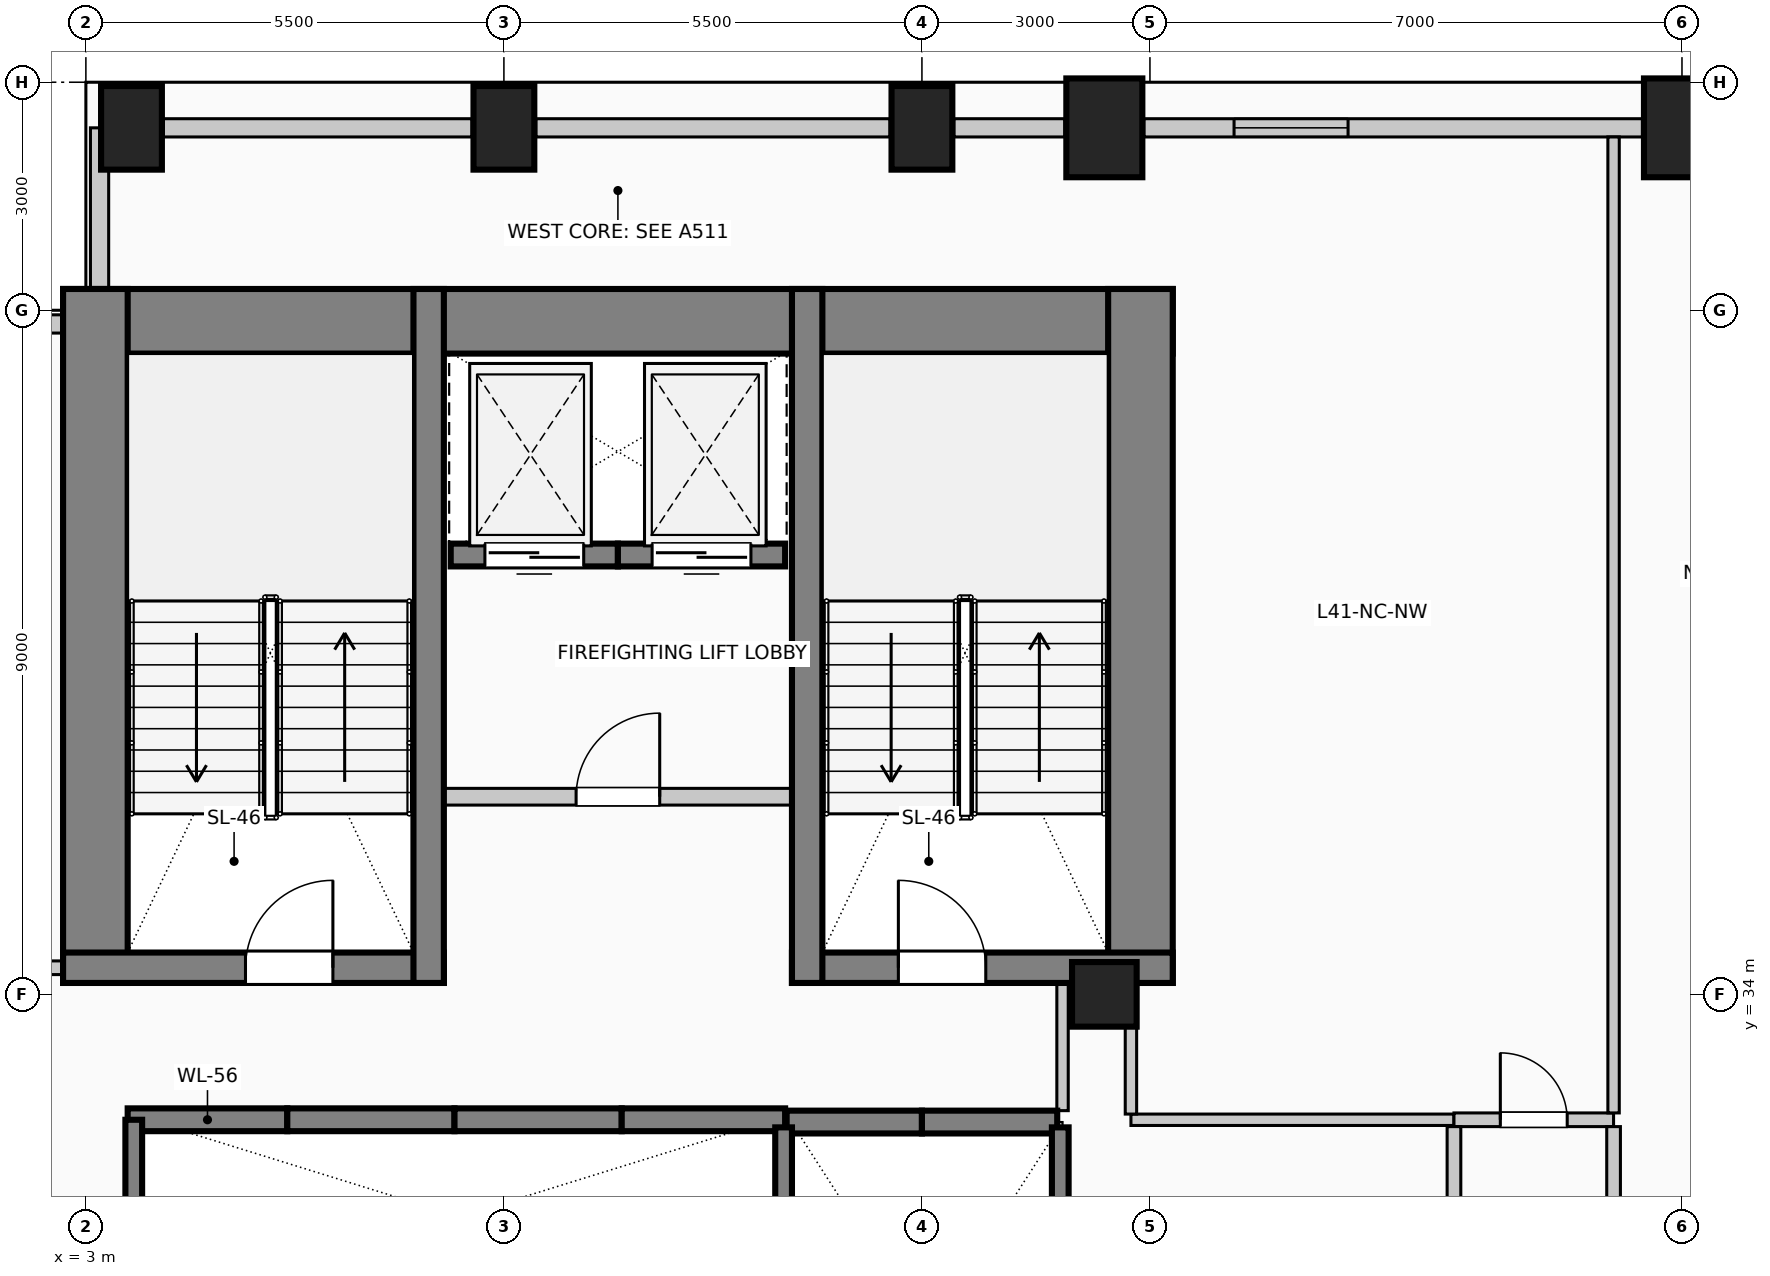
"""IFC4 building model, lengths in metres.
Left out: names, types, materials, properties, quantities, classifications, styles, units other than length and angle.
Written with IfcOpenShell. Run it as: python <this file> out.ifc"""

import sys

from ifc_helpers import new_model, si_unit, direction, frame, frame_2d, origin, origin_2d, place, context, subcontext, project, spatial, rectangle, circle, extrude, element, fill, save


model = new_model("IFC4")
c1 = context("Model", 3, precision=1e-05, world=origin(), true_north=direction((0.0, 1.0)))
c2 = subcontext(c1, "Body", "Model", "MODEL_VIEW")
j1 = project(units=[si_unit("LENGTHUNIT", "METRE"), si_unit("PLANEANGLEUNIT", "RADIAN")], contexts=[c1])
p1 = place(None, origin())
s1 = spatial("IfcSite", under=j1, at=p1, CompositionType="ELEMENT")
p2 = place(p1, origin())
s2 = spatial("IfcBuilding", under=s1, at=p2, CompositionType="ELEMENT")
p3 = place(p2, frame((0.0, 0.0, 170.6)))
s3 = spatial("IfcBuildingStorey", under=s2, at=p3, CompositionType="ELEMENT", Elevation=170.6)
p4 = place(p3, frame((2.7, 42.855, 0.0), z_axis=(0.0, 0.0, 1.0), x_axis=(1.0, 0.0, 0.0)))
e1 = element("IfcWall", 1, at=p4, inside=s3, PredefinedType="SHEAR", context=c2, shape_type="SweptSolid", body=[
    extrude(rectangle(XDim=14.6, YDim=0.85, at=frame_2d((7.3, 0.0))), origin(), (0.0, 0.0, 1.0), 4.0),
])
for number, where, z_axis, x_axis in (
    (2, (3.125, 34.15, 0.0), (0.0, 0.0, 1.0), (0.0, 1.0, 0.0)),
    (3, (16.875, 34.15, 0.0), (0.0, 0.0, 1.0), (0.0, 1.0, 0.0)),
):
    element("IfcWall", number, at=place(p3, frame(where, z_axis=z_axis, x_axis=x_axis)), inside=s3, PredefinedType="SHEAR", context=c2, shape_type="SweptSolid", body=[
        extrude(rectangle(XDim=9.13, YDim=0.85, at=frame_2d((4.565, 0.0))), origin(), (0.0, 0.0, 1.0), 4.0),
    ])
p5 = place(p3, frame((2.7, 34.35, 0.0), z_axis=(0.0, 0.0, 1.0), x_axis=(1.0, 0.0, 0.0)))
e4 = element("IfcWall", 4, at=p5, inside=s3, PredefinedType="SHEAR", context=c2, shape_type="SweptSolid", body=[
    extrude(rectangle(XDim=5.01, YDim=0.4, at=frame_2d((2.505, 0.0))), origin(), (0.0, 0.0, 1.0), 4.0),
])
p6 = place(p5, frame((2.4, 0.0, 0.0)))
e5 = element("IfcOpeningElement", 5, at=p6, cuts=e4, PredefinedType="OPENING", context=c2, shape_type="SweptSolid", body=[
    extrude(rectangle(XDim=1.15, YDim=2.2, at=frame_2d((0.575, 1.1))), frame((0.0, 0.21, 0.0), z_axis=(0.0, -1.0, 0.0), x_axis=(1.0, 0.0, 0.0)), (0.0, 0.0, 1.0), 0.42),
])
p7 = place(p3, frame((12.29, 34.35, 0.0), z_axis=(0.0, 0.0, 1.0), x_axis=(1.0, 0.0, 0.0)))
e6 = element("IfcWall", 6, at=p7, inside=s3, PredefinedType="SHEAR", context=c2, shape_type="SweptSolid", body=[
    extrude(rectangle(XDim=5.01, YDim=0.4, at=frame_2d((2.505, 0.0))), origin(), (0.0, 0.0, 1.0), 4.0),
])
p8 = place(p7, frame((1.4, 0.0, 0.0)))
e7 = element("IfcOpeningElement", 7, at=p8, cuts=e6, PredefinedType="OPENING", context=c2, shape_type="SweptSolid", body=[
    extrude(rectangle(XDim=1.15, YDim=2.2, at=frame_2d((0.575, 1.1))), frame((0.0, 0.21, 0.0), z_axis=(0.0, -1.0, 0.0), x_axis=(1.0, 0.0, 0.0)), (0.0, 0.0, 1.0), 0.42),
])
for number, where, z_axis, x_axis in (
    (8, (7.51, 34.15, 0.0), (0.0, 0.0, 1.0), (0.0, 1.0, 0.0)),
    (9, (12.49, 34.15, 0.0), (0.0, 0.0, 1.0), (0.0, 1.0, 0.0)),
):
    element("IfcWall", number, at=place(p3, frame(where, z_axis=z_axis, x_axis=x_axis)), inside=s3, PredefinedType="SHEAR", context=c2, shape_type="SweptSolid", body=[
        extrude(rectangle(XDim=9.13, YDim=0.4, at=frame_2d((4.565, 0.0))), origin(), (0.0, 0.0, 1.0), 4.0),
    ])
for number, where, z_axis, x_axis in (
    (10, (3.6, 45.4, 0.0), (0.0, 0.0, 1.0), (1.0, 0.0, 0.0)),
    (11, (8.5, 45.4, 0.0), (0.0, 0.0, 1.0), (1.0, 0.0, 0.0)),
    (12, (14.0, 45.4, 0.0), (0.0, 0.0, 1.0), (1.0, 0.0, 0.0)),
):
    element("IfcColumn", number, at=place(p3, frame(where, z_axis=z_axis, x_axis=x_axis)), inside=s3, PredefinedType="COLUMN", context=c2, shape_type="SweptSolid", body=[
        extrude(rectangle(XDim=0.8, YDim=1.1, at=origin_2d()), origin(), (0.0, 0.0, 1.0), 4.0),
    ])
for number, where, z_axis, x_axis in (
    (13, (16.4, 45.4, 0.0), (0.0, 0.0, 1.0), (1.0, 0.0, 0.0)),
    (14, (24.0, 45.4, 0.0), (0.0, 0.0, 1.0), (1.0, 0.0, 0.0)),
):
    element("IfcColumn", number, at=place(p3, frame(where, z_axis=z_axis, x_axis=x_axis)), inside=s3, PredefinedType="COLUMN", context=c2, shape_type="SweptSolid", body=[
        extrude(rectangle(XDim=1.0, YDim=1.3, at=origin_2d()), origin(), (0.0, 0.0, 1.0), 4.0),
    ])
p9 = place(p3, frame((16.4, 34.0, 0.0), z_axis=(0.0, 0.0, 1.0), x_axis=(1.0, 0.0, 0.0)))
e15 = element("IfcColumn", 15, at=p9, inside=s3, PredefinedType="COLUMN", context=c2, shape_type="SweptSolid", body=[
    extrude(circle(Radius=0.425, at=origin_2d()), origin(), (0.0, 0.0, 1.0), 4.0),
])
p10 = place(p3, frame((4.02, 45.4, 0.0), z_axis=(0.0, 0.0, 1.0), x_axis=(1.0, 0.0, 0.0)))
e16 = element("IfcWall", 16, at=p10, inside=s3, PredefinedType="SOLIDWALL", context=c2, shape_type="SweptSolid", body=[
    extrude(rectangle(XDim=4.06, YDim=0.24, at=frame_2d((2.03, 0.0))), origin(), (0.0, 0.0, 1.0), 2.975),
])
p11 = place(p3, frame((8.92, 45.4, 0.0), z_axis=(0.0, 0.0, 1.0), x_axis=(1.0, 0.0, 0.0)))
e17 = element("IfcWall", 17, at=p11, inside=s3, PredefinedType="SOLIDWALL", context=c2, shape_type="SweptSolid", body=[
    extrude(rectangle(XDim=4.66, YDim=0.24, at=frame_2d((2.33, 0.0))), origin(), (0.0, 0.0, 1.0), 2.975),
])
p12 = place(p3, frame((14.42, 45.4, 0.0), z_axis=(0.0, 0.0, 1.0), x_axis=(1.0, 0.0, 0.0)))
e18 = element("IfcWall", 18, at=p12, inside=s3, PredefinedType="SOLIDWALL", context=c2, shape_type="SweptSolid", body=[
    extrude(rectangle(XDim=1.46, YDim=0.24, at=frame_2d((0.73, 0.0))), origin(), (0.0, 0.0, 1.0), 2.975),
])
p13 = place(p3, frame((16.92, 45.4, 0.0), z_axis=(0.0, 0.0, 1.0), x_axis=(1.0, 0.0, 0.0)))
e19 = element("IfcWall", 19, at=p13, inside=s3, PredefinedType="SOLIDWALL", context=c2, shape_type="SweptSolid", body=[
    extrude(rectangle(XDim=6.56, YDim=0.24, at=frame_2d((3.28, 0.0))), origin(), (0.0, 0.0, 1.0), 2.975),
])
p14 = place(p13, frame((1.187, 0.0, 0.42)))
e20 = element("IfcOpeningElement", 20, at=p14, cuts=e19, PredefinedType="OPENING", context=c2, shape_type="SweptSolid", body=[
    extrude(rectangle(XDim=1.5, YDim=2.2, at=frame_2d((0.75, 1.1))), frame((0.0, 0.13, 0.0), z_axis=(0.0, -1.0, 0.0), x_axis=(1.0, 0.0, 0.0)), (0.0, 0.0, 1.0), 0.26),
])
p15 = place(p3, frame((0.6, 42.82, 0.0), z_axis=(0.0, 0.0, 1.0), x_axis=(1.0, 0.0, 0.0)))
e21 = element("IfcWall", 21, at=p15, inside=s3, PredefinedType="SOLIDWALL", context=c2, shape_type="SweptSolid", body=[
    extrude(rectangle(XDim=2.095, YDim=0.24, at=frame_2d((1.047, 0.0))), origin(), (0.0, 0.0, 1.0), 3.725),
])
p16 = place(p3, frame((3.18, 43.285, 0.0), z_axis=(0.0, 0.0, 1.0), x_axis=(0.0, 1.0, 0.0)))
e22 = element("IfcWall", 22, at=p16, inside=s3, PredefinedType="SOLIDWALL", context=c2, shape_type="SweptSolid", body=[
    extrude(rectangle(XDim=2.115, YDim=0.24, at=frame_2d((1.058, 0.0))), origin(), (0.0, 0.0, 1.0), 3.725),
])
for number, where, z_axis, x_axis in (
    (23, (12.22, 32.32, 0.0), (0.0, 0.0, 1.0), (1.0, 0.0, 0.0)),
    (24, (14.0, 32.32, 0.0), (0.0, 0.0, 1.0), (1.0, 0.0, 0.0)),
):
    element("IfcWall", number, at=place(p3, frame(where, z_axis=z_axis, x_axis=x_axis)), inside=s3, PredefinedType="SOLIDWALL", context=c2, shape_type="SweptSolid", body=[
        extrude(rectangle(XDim=1.78, YDim=0.3, at=frame_2d((0.89, 0.0))), origin(), (0.0, 0.0, 1.0), 4.0),
    ])
p17 = place(p3, frame((3.55, 32.35, 0.0), z_axis=(0.0, 0.0, 1.0), x_axis=(1.0, 0.0, 0.0)))
e25 = element("IfcWall", 25, at=p17, inside=s3, PredefinedType="SOLIDWALL", context=c2, shape_type="SweptSolid", body=[
    extrude(rectangle(XDim=2.1, YDim=0.3, at=frame_2d((1.05, 0.0))), origin(), (0.0, 0.0, 1.0), 4.0),
])
p18 = place(p3, frame((5.65, 32.35, 0.0), z_axis=(0.0, 0.0, 1.0), x_axis=(1.0, 0.0, 0.0)))
e26 = element("IfcWall", 26, at=p18, inside=s3, PredefinedType="SOLIDWALL", context=c2, shape_type="SweptSolid", body=[
    extrude(rectangle(XDim=2.2, YDim=0.3, at=frame_2d((1.1, 0.0))), origin(), (0.0, 0.0, 1.0), 4.0),
])
p19 = place(p3, frame((7.85, 32.35, 0.0), z_axis=(0.0, 0.0, 1.0), x_axis=(1.0, 0.0, 0.0)))
e27 = element("IfcWall", 27, at=p19, inside=s3, PredefinedType="SOLIDWALL", context=c2, shape_type="SweptSolid", body=[
    extrude(rectangle(XDim=2.2, YDim=0.3, at=frame_2d((1.1, 0.0))), origin(), (0.0, 0.0, 1.0), 4.0),
])
p20 = place(p3, frame((10.05, 32.35, 0.0), z_axis=(0.0, 0.0, 1.0), x_axis=(1.0, 0.0, 0.0)))
e28 = element("IfcWall", 28, at=p20, inside=s3, PredefinedType="SOLIDWALL", context=c2, shape_type="SweptSolid", body=[
    extrude(rectangle(XDim=2.15, YDim=0.3, at=frame_2d((1.075, 0.0))), origin(), (0.0, 0.0, 1.0), 4.0),
])
p21 = place(p3, frame((10.0, 39.78, 0.0), z_axis=(0.0, 0.0, 1.0), x_axis=(-1.0, 0.0, 0.0)))
e29 = element("IfcWall", 29, at=p21, inside=s3, PredefinedType="SOLIDWALL", context=c2, shape_type="SweptSolid", body=[
    extrude(rectangle(XDim=2.2, YDim=0.3, at=frame_2d((1.1, 0.0))), origin(), (0.0, 0.0, 1.0), 4.0),
])
p22 = place(p21, frame((0.45, 0.0, 0.0)))
e30 = element("IfcOpeningElement", 30, at=p22, cuts=e29, PredefinedType="OPENING", context=c2, shape_type="SweptSolid", body=[
    extrude(rectangle(XDim=1.3, YDim=2.25, at=frame_2d((0.65, 1.125))), frame((0.0, 0.16, 0.0), z_axis=(0.0, -1.0, 0.0), x_axis=(1.0, 0.0, 0.0)), (0.0, 0.0, 1.0), 0.32),
])
p23 = place(p3, frame((12.2, 39.78, 0.0), z_axis=(0.0, 0.0, 1.0), x_axis=(-1.0, 0.0, 0.0)))
e31 = element("IfcWall", 31, at=p23, inside=s3, PredefinedType="SOLIDWALL", context=c2, shape_type="SweptSolid", body=[
    extrude(rectangle(XDim=2.2, YDim=0.3, at=frame_2d((1.1, 0.0))), origin(), (0.0, 0.0, 1.0), 4.0),
])
p24 = place(p23, frame((0.45, 0.0, 0.0)))
e32 = element("IfcOpeningElement", 32, at=p24, cuts=e31, PredefinedType="OPENING", context=c2, shape_type="SweptSolid", body=[
    extrude(rectangle(XDim=1.3, YDim=2.25, at=frame_2d((0.65, 1.125))), frame((0.0, 0.16, 0.0), z_axis=(0.0, -1.0, 0.0), x_axis=(1.0, 0.0, 0.0)), (0.0, 0.0, 1.0), 0.32),
])
p25 = place(p3, frame((3.63, 26.8, 0.0), z_axis=(0.0, 0.0, 1.0), x_axis=(0.0, 1.0, 0.0)))
e33 = element("IfcWall", 33, at=p25, inside=s3, PredefinedType="SOLIDWALL", context=c2, shape_type="SweptSolid", body=[
    extrude(rectangle(XDim=5.55, YDim=0.22, at=frame_2d((2.775, 0.0))), origin(), (0.0, 0.0, 1.0), 4.0),
])
for number, where, z_axis, x_axis in (
    (34, (12.18, 26.8, 0.0), (0.0, 0.0, 1.0), (0.0, 1.0, 0.0)),
    (35, (15.82, 26.8, 0.0), (0.0, 0.0, 1.0), (0.0, 1.0, 0.0)),
):
    element("IfcWall", number, at=place(p3, frame(where, z_axis=z_axis, x_axis=x_axis)), inside=s3, PredefinedType="SOLIDWALL", context=c2, shape_type="SweptSolid", body=[
        extrude(rectangle(XDim=5.45, YDim=0.22, at=frame_2d((2.725, 0.0))), origin(), (0.0, 0.0, 1.0), 4.0),
    ])
p26 = place(p3, frame((7.51, 36.6, 0.0), z_axis=(0.0, 0.0, 1.0), x_axis=(1.0, 0.0, 0.0)))
e36 = element("IfcWall", 36, at=p26, inside=s3, PredefinedType="PARTITIONING", context=c2, shape_type="SweptSolid", body=[
    extrude(rectangle(XDim=4.98, YDim=0.22, at=frame_2d((2.49, 0.0))), origin(), (0.0, 0.0, 1.0), 3.725),
])
p27 = place(p26, frame((1.94, 0.0, 0.0)))
e37 = element("IfcOpeningElement", 37, at=p27, cuts=e36, PredefinedType="OPENING", context=c2, shape_type="SweptSolid", body=[
    extrude(rectangle(XDim=1.1, YDim=2.2, at=frame_2d((0.55, 1.1))), frame((0.0, 0.12, 0.0), z_axis=(0.0, -1.0, 0.0), x_axis=(1.0, 0.0, 0.0)), (0.0, 0.0, 1.0), 0.24),
])
p28 = place(p3, frame((16.75, 32.35, 0.0), z_axis=(0.0, 0.0, 1.0), x_axis=(1.0, 0.0, 0.0)))
e38 = element("IfcWall", 38, at=p28, inside=s3, PredefinedType="PARTITIONING", context=c2, shape_type="SweptSolid", body=[
    extrude(rectangle(XDim=4.25, YDim=0.15, at=frame_2d((2.125, 0.0))), origin(), (0.0, 0.0, 1.0), 3.725),
])
p29 = place(p3, frame((21.0, 32.35, 0.0), z_axis=(0.0, 0.0, 1.0), x_axis=(1.0, 0.0, 0.0)))
e39 = element("IfcWall", 39, at=p29, inside=s3, PredefinedType="PARTITIONING", context=c2, shape_type="SweptSolid", body=[
    extrude(rectangle(XDim=2.1, YDim=0.18, at=frame_2d((1.05, 0.0))), origin(), (0.0, 0.0, 1.0), 3.725),
])
p30 = place(p29, frame((0.61, 0.0, 0.0)))
e40 = element("IfcOpeningElement", 40, at=p30, cuts=e39, PredefinedType="OPENING", context=c2, shape_type="SweptSolid", body=[
    extrude(rectangle(XDim=0.88, YDim=2.1, at=frame_2d((0.44, 1.05))), frame((0.0, 0.1, 0.0), z_axis=(0.0, -1.0, 0.0), x_axis=(1.0, 0.0, 0.0)), (0.0, 0.0, 1.0), 0.2),
])
p31 = place(p3, frame((1.15, 34.35, 0.0), z_axis=(0.0, 0.0, 1.0), x_axis=(1.0, 0.0, 0.0)))
e41 = element("IfcWall", 41, at=p31, inside=s3, PredefinedType="PARTITIONING", context=c2, shape_type="SweptSolid", body=[
    extrude(rectangle(XDim=1.55, YDim=0.18, at=frame_2d((0.775, 0.0))), origin(), (0.0, 0.0, 1.0), 3.725),
])
p32 = place(p3, frame((15.85, 32.47, 0.0), z_axis=(0.0, 0.0, 1.0), x_axis=(0.0, 1.0, 0.0)))
e42 = element("IfcWall", 42, at=p32, inside=s3, PredefinedType="PARTITIONING", context=c2, shape_type="SweptSolid", body=[
    extrude(rectangle(XDim=1.68, YDim=0.15, at=frame_2d((0.84, 0.0))), origin(), (0.0, 0.0, 1.0), 3.725),
])
p33 = place(p3, frame((16.75, 32.425, 0.0), z_axis=(0.0, 0.0, 1.0), x_axis=(0.0, 1.0, 0.0)))
e43 = element("IfcWall", 43, at=p33, inside=s3, PredefinedType="PARTITIONING", context=c2, shape_type="SweptSolid", body=[
    extrude(rectangle(XDim=1.15, YDim=0.15, at=frame_2d((0.575, 0.0))), origin(), (0.0, 0.0, 1.0), 3.725),
])
p34 = place(p3, frame((21.0, 24.875, 0.0), z_axis=(0.0, 0.0, 1.0), x_axis=(0.0, 1.0, 0.0)))
e44 = element("IfcWall", 44, at=p34, inside=s3, PredefinedType="PARTITIONING", context=c2, shape_type="SweptSolid", body=[
    extrude(rectangle(XDim=7.385, YDim=0.18, at=frame_2d((3.692, 0.0))), origin(), (0.0, 0.0, 1.0), 3.725),
])
p35 = place(p3, frame((23.1, 29.14, 0.0), z_axis=(0.0, 0.0, 1.0), x_axis=(0.0, 1.0, 0.0)))
e45 = element("IfcWall", 45, at=p35, inside=s3, PredefinedType="PARTITIONING", context=c2, shape_type="SweptSolid", body=[
    extrude(rectangle(XDim=3.12, YDim=0.18, at=frame_2d((1.56, 0.0))), origin(), (0.0, 0.0, 1.0), 3.725),
])
p36 = place(p3, frame((23.1, 32.44, 0.0), z_axis=(0.0, 0.0, 1.0), x_axis=(0.0, 1.0, 0.0)))
e46 = element("IfcWall", 46, at=p36, inside=s3, PredefinedType="PARTITIONING", context=c2, shape_type="SweptSolid", body=[
    extrude(rectangle(XDim=12.84, YDim=0.15, at=frame_2d((6.42, 0.0))), origin(), (0.0, 0.0, 1.0), 3.725),
])
p37 = place(p14, origin())
e47 = element("IfcWindow", 47, at=p37, inside=s3, PartitioningType="SINGLE_PANEL", PredefinedType="WINDOW", context=c2, shape_type="SweptSolid", body=[
    extrude(rectangle(XDim=1.5, YDim=2.2, at=frame_2d((0.75, 1.1))), frame((0.0, 0.03, 0.0), z_axis=(0.0, -1.0, 0.0), x_axis=(1.0, 0.0, 0.0)), (0.0, 0.0, 1.0), 0.06),
])
fill(e20, e47)
p38 = place(p22, origin())
e48 = element("IfcDoor", 48, at=p38, inside=s3, OperationType="SLIDING_TO_LEFT", PredefinedType="DOOR", context=c2, shape_type="SweptSolid", body=[
    extrude(rectangle(XDim=1.3, YDim=2.25, at=frame_2d((0.65, 1.125))), frame((0.0, 0.025, 0.0), z_axis=(0.0, -1.0, 0.0), x_axis=(1.0, 0.0, 0.0)), (0.0, 0.0, 1.0), 0.05),
])
fill(e30, e48)
p39 = place(p24, origin())
e49 = element("IfcDoor", 49, at=p39, inside=s3, OperationType="SLIDING_TO_RIGHT", PredefinedType="DOOR", context=c2, shape_type="SweptSolid", body=[
    extrude(rectangle(XDim=1.3, YDim=2.25, at=frame_2d((0.65, 1.125))), frame((0.0, 0.025, 0.0), z_axis=(0.0, -1.0, 0.0), x_axis=(1.0, 0.0, 0.0)), (0.0, 0.0, 1.0), 0.05),
])
fill(e32, e49)
p40 = place(p6, origin())
e50 = element("IfcDoor", 50, at=p40, inside=s3, OperationType="SINGLE_SWING_RIGHT", PredefinedType="DOOR", context=c2, shape_type="SweptSolid", body=[
    extrude(rectangle(XDim=1.15, YDim=2.2, at=frame_2d((0.575, 1.1))), frame((0.0, 0.025, 0.0), z_axis=(0.0, -1.0, 0.0), x_axis=(1.0, 0.0, 0.0)), (0.0, 0.0, 1.0), 0.05),
])
fill(e5, e50)
p41 = place(p8, origin())
e51 = element("IfcDoor", 51, at=p41, inside=s3, OperationType="SINGLE_SWING_LEFT", PredefinedType="DOOR", context=c2, shape_type="SweptSolid", body=[
    extrude(rectangle(XDim=1.15, YDim=2.2, at=frame_2d((0.575, 1.1))), frame((0.0, 0.025, 0.0), z_axis=(0.0, -1.0, 0.0), x_axis=(1.0, 0.0, 0.0)), (0.0, 0.0, 1.0), 0.05),
])
fill(e7, e51)
p42 = place(p27, origin())
e52 = element("IfcDoor", 52, at=p42, inside=s3, OperationType="SINGLE_SWING_RIGHT", PredefinedType="DOOR", context=c2, shape_type="SweptSolid", body=[
    extrude(rectangle(XDim=1.1, YDim=2.2, at=frame_2d((0.55, 1.1))), frame((0.0, 0.025, 0.0), z_axis=(0.0, -1.0, 0.0), x_axis=(1.0, 0.0, 0.0)), (0.0, 0.0, 1.0), 0.05),
])
fill(e37, e52)
p43 = place(p30, origin())
e53 = element("IfcDoor", 53, at=p43, inside=s3, OperationType="SINGLE_SWING_LEFT", PredefinedType="DOOR", context=c2, shape_type="SweptSolid", body=[
    extrude(rectangle(XDim=0.88, YDim=2.1, at=frame_2d((0.44, 1.05))), frame((0.0, 0.025, 0.0), z_axis=(0.0, -1.0, 0.0), x_axis=(1.0, 0.0, 0.0)), (0.0, 0.0, 1.0), 0.05),
])
fill(e40, e53)
save(model, sys.argv[1])
